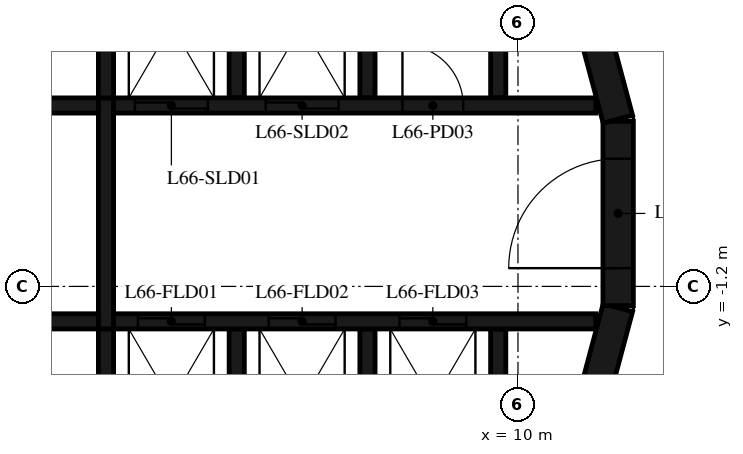
"""IFC4 building model, lengths in metres.
Left out: names, types, materials, properties, quantities, classifications, styles, units other than length and angle.
Written with IfcOpenShell. Run it as: python <this file> out.ifc"""

import sys

from ifc_helpers import new_model, si_unit, direction, frame, frame_2d, origin, place, context, subcontext, project, spatial, polyline, rectangle, outline, extrude, element, fill, save


model = new_model("IFC4")
c1 = context("Model", 3, precision=1e-05, world=origin(), true_north=direction((0.0, 1.0)))
c2 = subcontext(c1, "Body", "Model", "MODEL_VIEW")
j1 = project(units=[si_unit("LENGTHUNIT", "METRE"), si_unit("PLANEANGLEUNIT", "RADIAN")], contexts=[c1])
p1 = place(None, origin())
s1 = spatial("IfcSite", under=j1, at=p1, CompositionType="ELEMENT")
p2 = place(p1, origin())
s2 = spatial("IfcBuilding", under=s1, at=p2, CompositionType="ELEMENT")
p3 = place(p2, frame((0.0, 0.0, 258.2)))
s3 = spatial("IfcBuildingStorey", under=s2, at=p3, CompositionType="ELEMENT", Elevation=258.2)
p4 = place(p3, frame((10.858, -4.479, 0.0), z_axis=(0.0, 0.0, 1.0), x_axis=(0.258734743916, 0.965948410781, 0.0)))
e1 = element("IfcWall", 1, at=p4, inside=s3, PredefinedType="SHEAR", context=c2, shape_type="SweptSolid", body=[
    extrude(rectangle(XDim=3.033, YDim=0.5, at=frame_2d((1.516, 0.0))), origin(), (0.0, 0.0, 1.0), 4.75),
])
p5 = place(p3, frame((11.647, -1.516, 0.0), z_axis=(0.0, 0.0, 1.0), x_axis=(0.0, 1.0, 0.0)))
e2 = element("IfcWall", 2, at=p5, inside=s3, PredefinedType="SHEAR", context=c2, shape_type="SweptSolid", body=[
    extrude(rectangle(XDim=3.033, YDim=0.5, at=frame_2d((1.516, 0.0))), origin(), (0.0, 0.0, 1.0), 4.75),
])
p6 = place(p5, frame((0.616, 0.0, 0.0)))
e3 = element("IfcOpeningElement", 3, at=p6, cuts=e2, PredefinedType="OPENING", context=c2, shape_type="SweptSolid", body=[
    extrude(rectangle(XDim=1.8, YDim=2.1, at=frame_2d((0.9, 1.05))), frame((0.0, 0.26, 0.0), z_axis=(0.0, -1.0, 0.0), x_axis=(1.0, 0.0, 0.0)), (0.0, 0.0, 1.0), 0.52),
])
p7 = place(p3, frame((11.643, 1.55, 0.0), z_axis=(0.0, 0.0, 1.0), x_axis=(-0.258734743916, 0.965948410781, 0.0)))
e4 = element("IfcWall", 4, at=p7, inside=s3, PredefinedType="SHEAR", context=c2, shape_type="SweptSolid", body=[
    extrude(rectangle(XDim=3.033, YDim=0.5, at=frame_2d((1.516, 0.0))), origin(), (0.0, 0.0, 1.0), 4.75),
])
p8 = place(p3, origin())
e5 = element("IfcWall", 5, at=p8, inside=s3, PredefinedType="SHEAR", context=c2, shape_type="SweptSolid", body=[
    extrude(outline(polyline([(-9.55, 4.8), (-5.5, 4.8), (-5.5, 1.9), (-5.25, 1.9), (-5.25, 4.8), (-1.2, 4.8), (-1.2, 1.9), (-0.95, 1.9), (-0.95, 4.8), (0.95, 4.8), (0.95, 1.9), (1.2, 1.9), (1.2, 4.8), (3.1, 4.8), (3.1, 1.9), (3.35, 1.9), (3.35, 4.8), (5.25, 4.8), (5.25, 1.9), (5.5, 1.9), (5.5, 4.8), (7.4, 4.8), (7.4, 1.9), (7.65, 1.9), (7.65, 4.8), (9.55, 4.8), (9.55, 1.9), (9.8, 1.9), (9.8, 4.8), (9.8, 5.05), (-9.8, 5.05), (-9.8, 4.8), (-9.8, 1.9), (-9.55, 1.9), (-9.55, 4.8)])), origin(), (0.0, 0.0, 1.0), 4.75),
])
p9 = place(p3, origin())
e6 = element("IfcWall", 6, at=p9, inside=s3, PredefinedType="SHEAR", context=c2, shape_type="SweptSolid", body=[
    extrude(outline(polyline([(9.8, -5.05), (9.8, -4.8), (9.8, -1.9), (9.55, -1.9), (9.55, -4.8), (7.65, -4.8), (7.65, -1.9), (7.4, -1.9), (7.4, -4.8), (5.5, -4.8), (5.5, -1.9), (5.25, -1.9), (5.25, -4.8), (3.35, -4.8), (3.35, -1.9), (3.1, -1.9), (3.1, -4.8), (1.2, -4.8), (1.2, -1.9), (0.95, -1.9), (0.95, -4.8), (-0.95, -4.8), (-0.95, -1.9), (-1.2, -1.9), (-1.2, -4.8), (-3.1, -4.8), (-3.1, -1.9), (-3.35, -1.9), (-3.35, -4.8), (-5.25, -4.8), (-5.25, -1.9), (-5.5, -1.9), (-5.5, -4.8), (-7.4, -4.8), (-7.4, -1.9), (-7.65, -1.9), (-7.65, -4.8), (-9.55, -4.8), (-9.55, -1.9), (-9.8, -1.9), (-9.8, -4.8), (-9.8, -5.05), (9.8, -5.05)])), origin(), (0.0, 0.0, 1.0), 4.75),
])
p10 = place(p3, frame((-11.28, 1.775, 0.0), z_axis=(0.0, 0.0, 1.0), x_axis=(1.0, 0.0, 0.0)))
e7 = element("IfcWall", 7, at=p10, inside=s3, PredefinedType="SHEAR", context=c2, shape_type="SweptSolid", body=[
    extrude(rectangle(XDim=14.38, YDim=0.25, at=frame_2d((7.19, 0.0))), origin(), (0.0, 0.0, 1.0), 4.75),
])
p11 = place(p10, frame((3.255, 0.0, 0.0)))
e8 = element("IfcOpeningElement", 8, at=p11, cuts=e7, PredefinedType="OPENING", context=c2, shape_type="SweptSolid", body=[
    extrude(rectangle(XDim=1.0, YDim=2.4, at=frame_2d((0.5, 1.2))), frame((0.0, 0.135, 0.0), z_axis=(0.0, -1.0, 0.0), x_axis=(1.0, 0.0, 0.0)), (0.0, 0.0, 1.0), 0.27),
])
p12 = place(p10, frame((7.555, 0.0, 0.0)))
e9 = element("IfcOpeningElement", 9, at=p12, cuts=e7, PredefinedType="OPENING", context=c2, shape_type="SweptSolid", body=[
    extrude(rectangle(XDim=1.0, YDim=2.4, at=frame_2d((0.5, 1.2))), frame((0.0, 0.135, 0.0), z_axis=(0.0, -1.0, 0.0), x_axis=(1.0, 0.0, 0.0)), (0.0, 0.0, 1.0), 0.27),
])
p13 = place(p3, frame((3.35, 1.775, 0.0), z_axis=(0.0, 0.0, 1.0), x_axis=(1.0, 0.0, 0.0)))
e10 = element("IfcWall", 10, at=p13, inside=s3, PredefinedType="SHEAR", context=c2, shape_type="SweptSolid", body=[
    extrude(rectangle(XDim=7.93, YDim=0.25, at=frame_2d((3.965, 0.0))), origin(), (0.0, 0.0, 1.0), 4.75),
])
p14 = place(p13, frame((0.35, 0.0, 0.0)))
e11 = element("IfcOpeningElement", 11, at=p14, cuts=e10, PredefinedType="OPENING", context=c2, shape_type="SweptSolid", body=[
    extrude(rectangle(XDim=1.2, YDim=2.4, at=frame_2d((0.6, 1.2))), frame((0.0, 0.135, 0.0), z_axis=(0.0, -1.0, 0.0), x_axis=(1.0, 0.0, 0.0)), (0.0, 0.0, 1.0), 0.27),
])
p15 = place(p13, frame((2.5, 0.0, 0.0)))
e12 = element("IfcOpeningElement", 12, at=p15, cuts=e10, PredefinedType="OPENING", context=c2, shape_type="SweptSolid", body=[
    extrude(rectangle(XDim=1.2, YDim=2.4, at=frame_2d((0.6, 1.2))), frame((0.0, 0.135, 0.0), z_axis=(0.0, -1.0, 0.0), x_axis=(1.0, 0.0, 0.0)), (0.0, 0.0, 1.0), 0.27),
])
p16 = place(p13, frame((4.75, 0.0, 0.0)))
e13 = element("IfcOpeningElement", 13, at=p16, cuts=e10, PredefinedType="OPENING", context=c2, shape_type="SweptSolid", body=[
    extrude(rectangle(XDim=1.0, YDim=2.4, at=frame_2d((0.5, 1.2))), frame((0.0, 0.135, 0.0), z_axis=(0.0, -1.0, 0.0), x_axis=(1.0, 0.0, 0.0)), (0.0, 0.0, 1.0), 0.27),
])
p17 = place(p3, frame((-11.28, -1.775, 0.0), z_axis=(0.0, 0.0, 1.0), x_axis=(1.0, 0.0, 0.0)))
e14 = element("IfcWall", 14, at=p17, inside=s3, PredefinedType="SHEAR", context=c2, shape_type="SweptSolid", body=[
    extrude(rectangle(XDim=14.38, YDim=0.25, at=frame_2d((7.19, 0.0))), origin(), (0.0, 0.0, 1.0), 4.75),
])
p18 = place(p17, frame((2.03, 0.0, 0.0)))
e15 = element("IfcOpeningElement", 15, at=p18, cuts=e14, PredefinedType="OPENING", context=c2, shape_type="SweptSolid", body=[
    extrude(rectangle(XDim=1.3, YDim=2.1, at=frame_2d((0.65, 1.05))), frame((0.0, 0.135, 0.0), z_axis=(0.0, -1.0, 0.0), x_axis=(1.0, 0.0, 0.0)), (0.0, 0.0, 1.0), 0.27),
])
p19 = place(p17, frame((4.18, 0.0, 0.0)))
e16 = element("IfcOpeningElement", 16, at=p19, cuts=e14, PredefinedType="OPENING", context=c2, shape_type="SweptSolid", body=[
    extrude(rectangle(XDim=1.3, YDim=2.1, at=frame_2d((0.65, 1.05))), frame((0.0, 0.135, 0.0), z_axis=(0.0, -1.0, 0.0), x_axis=(1.0, 0.0, 0.0)), (0.0, 0.0, 1.0), 0.27),
])
p20 = place(p17, frame((6.53, 0.0, 0.0)))
e17 = element("IfcOpeningElement", 17, at=p20, cuts=e14, PredefinedType="OPENING", context=c2, shape_type="SweptSolid", body=[
    extrude(rectangle(XDim=0.9, YDim=2.1, at=frame_2d((0.45, 1.05))), frame((0.0, 0.135, 0.0), z_axis=(0.0, -1.0, 0.0), x_axis=(1.0, 0.0, 0.0)), (0.0, 0.0, 1.0), 0.27),
])
p21 = place(p17, frame((8.68, 0.0, 0.0)))
e18 = element("IfcOpeningElement", 18, at=p21, cuts=e14, PredefinedType="OPENING", context=c2, shape_type="SweptSolid", body=[
    extrude(rectangle(XDim=0.9, YDim=2.1, at=frame_2d((0.45, 1.05))), frame((0.0, 0.135, 0.0), z_axis=(0.0, -1.0, 0.0), x_axis=(1.0, 0.0, 0.0)), (0.0, 0.0, 1.0), 0.27),
])
p22 = place(p17, frame((10.83, 0.0, 0.0)))
e19 = element("IfcOpeningElement", 19, at=p22, cuts=e14, PredefinedType="OPENING", context=c2, shape_type="SweptSolid", body=[
    extrude(rectangle(XDim=0.9, YDim=2.1, at=frame_2d((0.45, 1.05))), frame((0.0, 0.135, 0.0), z_axis=(0.0, -1.0, 0.0), x_axis=(1.0, 0.0, 0.0)), (0.0, 0.0, 1.0), 0.27),
])
p23 = place(p3, frame((3.35, -1.775, 0.0), z_axis=(0.0, 0.0, 1.0), x_axis=(1.0, 0.0, 0.0)))
e20 = element("IfcWall", 20, at=p23, inside=s3, PredefinedType="SHEAR", context=c2, shape_type="SweptSolid", body=[
    extrude(rectangle(XDim=7.93, YDim=0.25, at=frame_2d((3.965, 0.0))), origin(), (0.0, 0.0, 1.0), 4.75),
])
p24 = place(p23, frame((0.4, 0.0, 0.0)))
e21 = element("IfcOpeningElement", 21, at=p24, cuts=e20, PredefinedType="OPENING", context=c2, shape_type="SweptSolid", body=[
    extrude(rectangle(XDim=1.1, YDim=2.4, at=frame_2d((0.55, 1.2))), frame((0.0, 0.135, 0.0), z_axis=(0.0, -1.0, 0.0), x_axis=(1.0, 0.0, 0.0)), (0.0, 0.0, 1.0), 0.27),
])
p25 = place(p23, frame((2.55, 0.0, 0.0)))
e22 = element("IfcOpeningElement", 22, at=p25, cuts=e20, PredefinedType="OPENING", context=c2, shape_type="SweptSolid", body=[
    extrude(rectangle(XDim=1.1, YDim=2.4, at=frame_2d((0.55, 1.2))), frame((0.0, 0.135, 0.0), z_axis=(0.0, -1.0, 0.0), x_axis=(1.0, 0.0, 0.0)), (0.0, 0.0, 1.0), 0.27),
])
p26 = place(p23, frame((4.7, 0.0, 0.0)))
e23 = element("IfcOpeningElement", 23, at=p26, cuts=e20, PredefinedType="OPENING", context=c2, shape_type="SweptSolid", body=[
    extrude(rectangle(XDim=1.1, YDim=2.4, at=frame_2d((0.55, 1.2))), frame((0.0, 0.135, 0.0), z_axis=(0.0, -1.0, 0.0), x_axis=(1.0, 0.0, 0.0)), (0.0, 0.0, 1.0), 0.27),
])
p27 = place(p3, frame((3.225, -1.9, 0.0), z_axis=(0.0, 0.0, 1.0), x_axis=(0.0, 1.0, 0.0)))
e24 = element("IfcWall", 24, at=p27, inside=s3, PredefinedType="SHEAR", context=c2, shape_type="SweptSolid", body=[
    extrude(rectangle(XDim=3.8, YDim=0.25, at=frame_2d((1.9, 0.0))), origin(), (0.0, 0.0, 1.0), 4.75),
])
p28 = place(p6, origin())
e25 = element("IfcDoor", 25, at=p28, inside=s3, OperationType="DOUBLE_DOOR_SINGLE_SWING", PredefinedType="DOOR", context=c2, shape_type="SweptSolid", body=[
    extrude(rectangle(XDim=1.8, YDim=2.1, at=frame_2d((0.9, 1.05))), frame((0.0, 0.025, 0.0), z_axis=(0.0, -1.0, 0.0), x_axis=(1.0, 0.0, 0.0)), (0.0, 0.0, 1.0), 0.05),
])
fill(e3, e25)
p29 = place(p14, origin())
e26 = element("IfcDoor", 26, at=p29, inside=s3, OperationType="DOUBLE_DOOR_SLIDING", PredefinedType="DOOR", context=c2, shape_type="SweptSolid", body=[
    extrude(rectangle(XDim=1.2, YDim=2.4, at=frame_2d((0.6, 1.2))), frame((0.0, 0.025, 0.0), z_axis=(0.0, -1.0, 0.0), x_axis=(1.0, 0.0, 0.0)), (0.0, 0.0, 1.0), 0.05),
])
fill(e11, e26)
p30 = place(p15, origin())
e27 = element("IfcDoor", 27, at=p30, inside=s3, OperationType="DOUBLE_DOOR_SLIDING", PredefinedType="DOOR", context=c2, shape_type="SweptSolid", body=[
    extrude(rectangle(XDim=1.2, YDim=2.4, at=frame_2d((0.6, 1.2))), frame((0.0, 0.025, 0.0), z_axis=(0.0, -1.0, 0.0), x_axis=(1.0, 0.0, 0.0)), (0.0, 0.0, 1.0), 0.05),
])
fill(e12, e27)
p31 = place(p24, origin())
e28 = element("IfcDoor", 28, at=p31, inside=s3, OperationType="DOUBLE_DOOR_SLIDING", PredefinedType="DOOR", context=c2, shape_type="SweptSolid", body=[
    extrude(rectangle(XDim=1.1, YDim=2.4, at=frame_2d((0.55, 1.2))), frame((0.0, 0.025, 0.0), z_axis=(0.0, -1.0, 0.0), x_axis=(1.0, 0.0, 0.0)), (0.0, 0.0, 1.0), 0.05),
])
fill(e21, e28)
p32 = place(p25, origin())
e29 = element("IfcDoor", 29, at=p32, inside=s3, OperationType="DOUBLE_DOOR_SLIDING", PredefinedType="DOOR", context=c2, shape_type="SweptSolid", body=[
    extrude(rectangle(XDim=1.1, YDim=2.4, at=frame_2d((0.55, 1.2))), frame((0.0, 0.025, 0.0), z_axis=(0.0, -1.0, 0.0), x_axis=(1.0, 0.0, 0.0)), (0.0, 0.0, 1.0), 0.05),
])
fill(e22, e29)
p33 = place(p26, origin())
e30 = element("IfcDoor", 30, at=p33, inside=s3, OperationType="DOUBLE_DOOR_SLIDING", PredefinedType="DOOR", context=c2, shape_type="SweptSolid", body=[
    extrude(rectangle(XDim=1.1, YDim=2.4, at=frame_2d((0.55, 1.2))), frame((0.0, 0.025, 0.0), z_axis=(0.0, -1.0, 0.0), x_axis=(1.0, 0.0, 0.0)), (0.0, 0.0, 1.0), 0.05),
])
fill(e23, e30)
p34 = place(p16, origin())
e31 = element("IfcDoor", 31, at=p34, inside=s3, OperationType="SINGLE_SWING_RIGHT", PredefinedType="DOOR", context=c2, shape_type="SweptSolid", body=[
    extrude(rectangle(XDim=1.0, YDim=2.4, at=frame_2d((0.5, 1.2))), frame((0.0, 0.025, 0.0), z_axis=(0.0, -1.0, 0.0), x_axis=(1.0, 0.0, 0.0)), (0.0, 0.0, 1.0), 0.05),
])
fill(e13, e31)
save(model, sys.argv[1])
